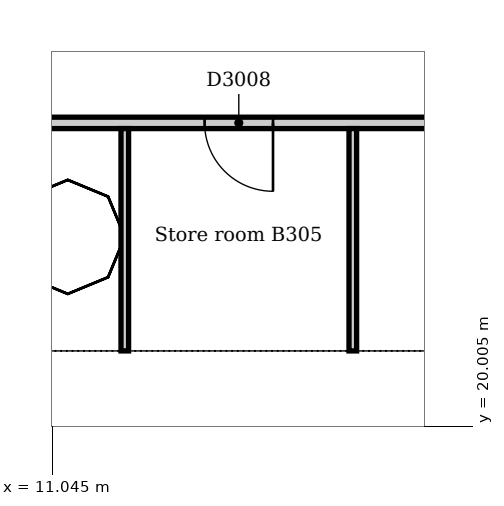
"""IFC4 building model, lengths in metres.
Left out: names, types, materials, properties, quantities, classifications, styles, units other than length and angle.
Written with IfcOpenShell. Run it as: python <this file> out.ifc"""

import sys

from ifc_helpers import new_model, si_unit, direction, frame, frame_2d, origin, place, context, subcontext, project, spatial, rectangle, extrude, element, fill, save


model = new_model("IFC4")
c1 = context("Model", 3, precision=1e-05, world=origin(), true_north=direction((0.0, 1.0)))
c2 = subcontext(c1, "Body", "Model", "MODEL_VIEW")
j1 = project(units=[si_unit("LENGTHUNIT", "METRE"), si_unit("PLANEANGLEUNIT", "RADIAN")], contexts=[c1])
p1 = place(None, origin())
s1 = spatial("IfcSite", under=j1, at=p1, CompositionType="ELEMENT")
p2 = place(p1, origin())
s2 = spatial("IfcBuilding", under=s1, at=p2, CompositionType="ELEMENT")
p3 = place(p2, frame((0.0, 0.0, -14.0)))
s3 = spatial("IfcBuildingStorey", under=s2, at=p3, CompositionType="ELEMENT", Elevation=-14.0)
p4 = place(p3, frame((3.9, 20.4, 0.0), z_axis=(0.0, 0.0, 1.0), x_axis=(1.0, 0.0, 0.0)))
e1 = element("IfcWall", 1, at=p4, inside=s3, PredefinedType="SOLIDWALL", context=c2, shape_type="SweptSolid", body=[
    extrude(rectangle(XDim=19.8, YDim=1.2, at=frame_2d((9.9, 0.0))), origin(), (0.0, 0.0, 1.0), 4.5),
])
p5 = place(p3, frame((4.5, 24.0, 0.0), z_axis=(0.0, 0.0, 1.0), x_axis=(1.0, 0.0, 0.0)))
e2 = element("IfcWall", 2, at=p5, inside=s3, PredefinedType="PARTITIONING", context=c2, shape_type="SweptSolid", body=[
    extrude(rectangle(XDim=18.0, YDim=0.15, at=frame_2d((9.0, 0.0))), origin(), (0.0, 0.0, 1.0), 4.15),
])
p6 = place(p5, frame((3.35, 0.0, 0.0)))
e3 = element("IfcOpeningElement", 3, at=p6, cuts=e2, PredefinedType="OPENING", context=c2, shape_type="SweptSolid", body=[
    extrude(rectangle(XDim=0.9, YDim=2.1, at=frame_2d((0.45, 1.05))), frame((0.0, 0.085, 0.0), z_axis=(0.0, -1.0, 0.0), x_axis=(1.0, 0.0, 0.0)), (0.0, 0.0, 1.0), 0.17),
])
p7 = place(p5, frame((8.55, 0.0, 0.0)))
e4 = element("IfcOpeningElement", 4, at=p7, cuts=e2, PredefinedType="OPENING", context=c2, shape_type="SweptSolid", body=[
    extrude(rectangle(XDim=0.9, YDim=2.1, at=frame_2d((0.45, 1.05))), frame((0.0, 0.085, 0.0), z_axis=(0.0, -1.0, 0.0), x_axis=(1.0, 0.0, 0.0)), (0.0, 0.0, 1.0), 0.17),
])
p8 = place(p5, frame((13.7, 0.0, 0.0)))
e5 = element("IfcOpeningElement", 5, at=p8, cuts=e2, PredefinedType="OPENING", context=c2, shape_type="SweptSolid", body=[
    extrude(rectangle(XDim=0.9, YDim=2.1, at=frame_2d((0.45, 1.05))), frame((0.0, 0.085, 0.0), z_axis=(0.0, -1.0, 0.0), x_axis=(1.0, 0.0, 0.0)), (0.0, 0.0, 1.0), 0.17),
])
for number, where, z_axis, x_axis in (
    (6, (12.0, 21.0, 0.0), (0.0, 0.0, 1.0), (0.0, 1.0, 0.0)),
    (7, (15.0, 21.0, 0.0), (0.0, 0.0, 1.0), (0.0, 1.0, 0.0)),
):
    element("IfcWall", number, at=place(p3, frame(where, z_axis=z_axis, x_axis=x_axis)), inside=s3, PredefinedType="PARTITIONING", context=c2, shape_type="SweptSolid", body=[
        extrude(rectangle(XDim=2.925, YDim=0.1, at=frame_2d((1.462, 0.0))), origin(), (0.0, 0.0, 1.0), 4.15),
    ])
p9 = place(p7, frame((0.9, 0.0, 0.0), z_axis=(0.0, 0.0, 1.0), x_axis=(-1.0, 0.0, 0.0)))
e8 = element("IfcDoor", 8, at=p9, inside=s3, OperationType="SINGLE_SWING_LEFT", PredefinedType="DOOR", context=c2, shape_type="SweptSolid", body=[
    extrude(rectangle(XDim=0.9, YDim=2.1, at=frame_2d((0.45, 1.05))), frame((0.0, 0.025, 0.0), z_axis=(0.0, -1.0, 0.0), x_axis=(1.0, 0.0, 0.0)), (0.0, 0.0, 1.0), 0.05),
])
fill(e4, e8)
save(model, sys.argv[1])
